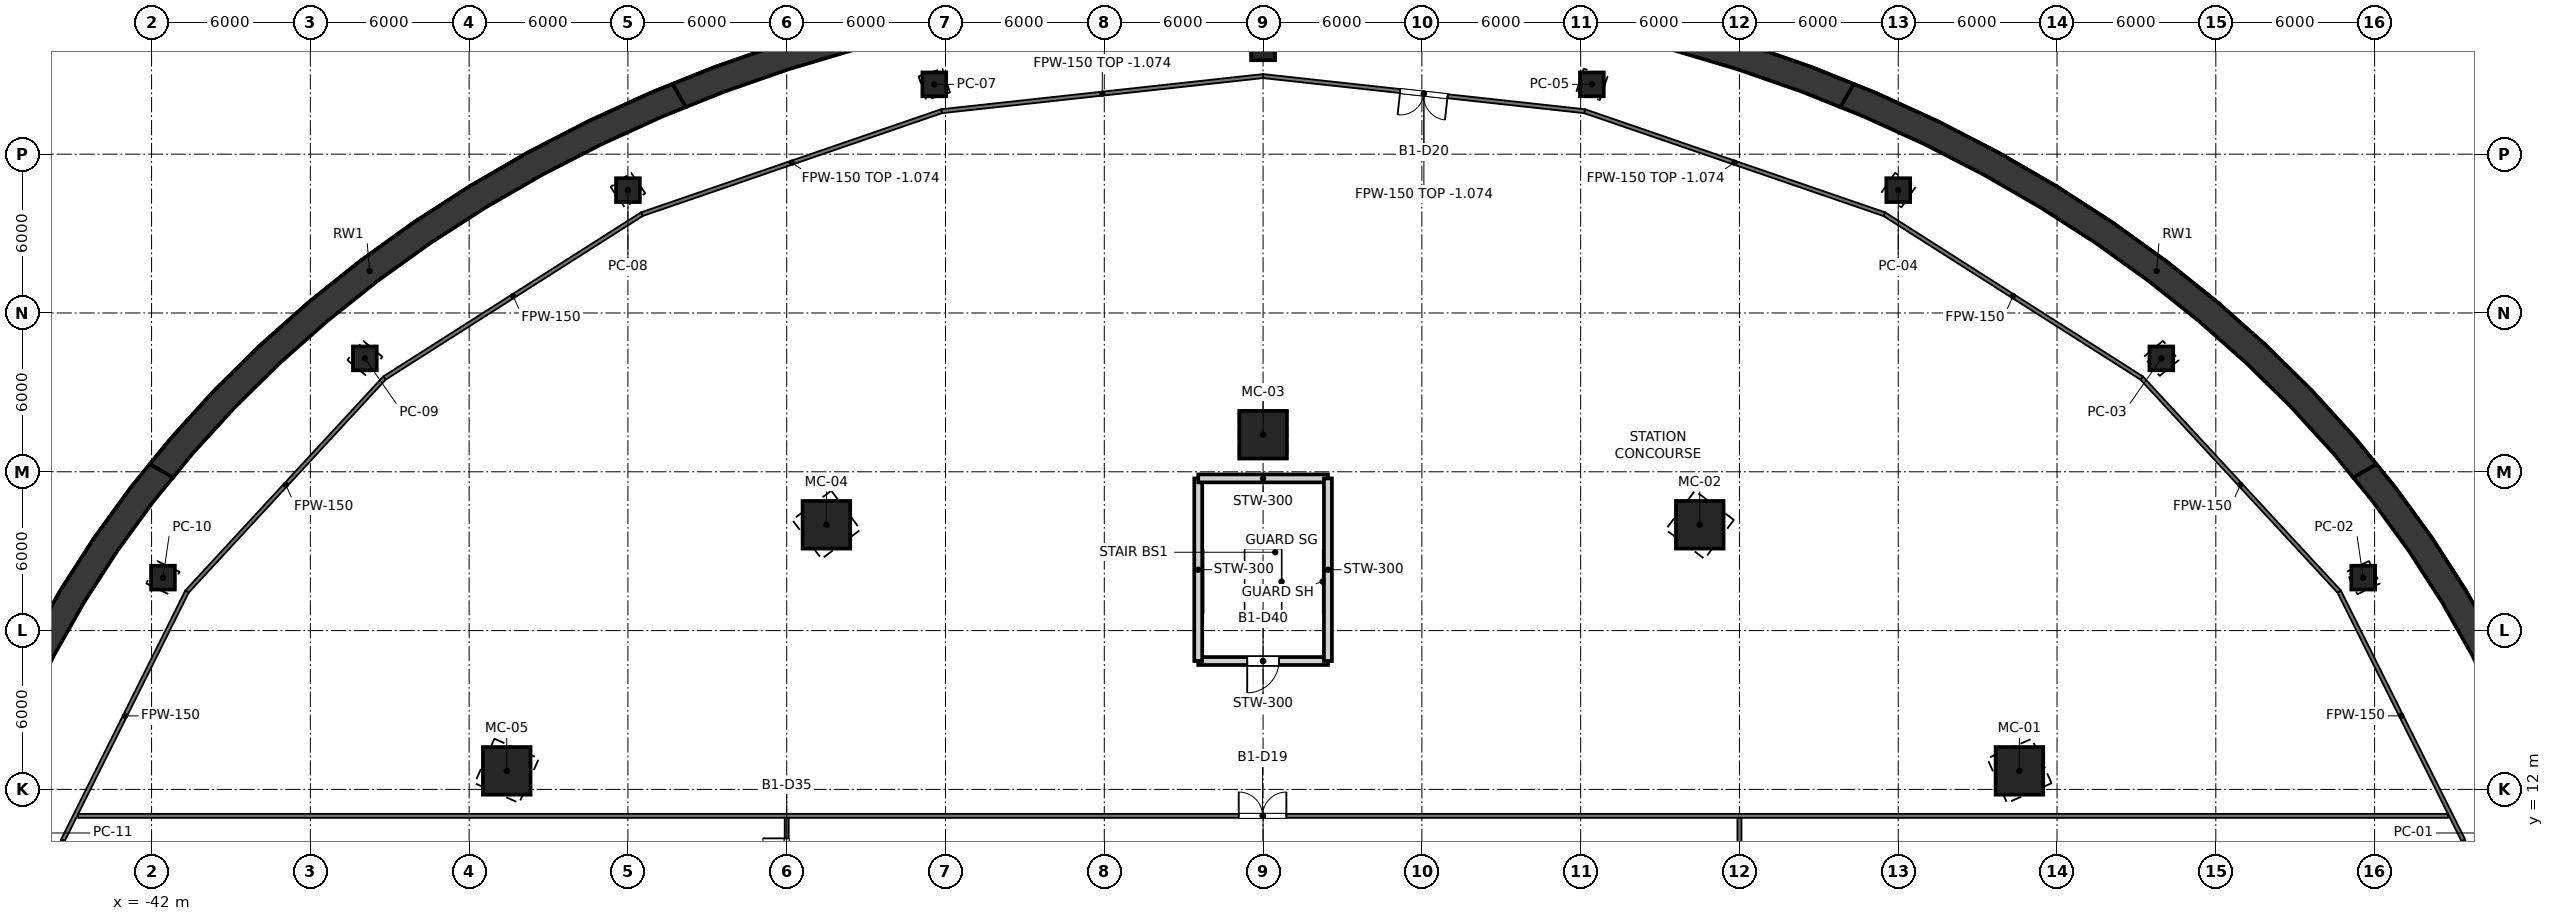
"""IFC4 building model, lengths in metres.
Left out: names, types, materials, properties, quantities, classifications, styles, units other than length and angle.
Written with IfcOpenShell. Run it as: python <this file> out.ifc"""

import sys

from ifc_helpers import new_model, si_unit, direction, frame, frame_2d, origin, origin_2d, place, context, subcontext, project, spatial, polyline, rectangle, hollow_rectangle, outline, extrude, element, fill, save


model = new_model("IFC4")
c1 = context("Model", 3, precision=1e-05, world=origin(), true_north=direction((0.0, 1.0)))
c2 = subcontext(c1, "Body", "Model", "MODEL_VIEW")
j1 = project(units=[si_unit("LENGTHUNIT", "METRE"), si_unit("PLANEANGLEUNIT", "RADIAN")], contexts=[c1])
p1 = place(None, origin())
s1 = spatial("IfcSite", under=j1, at=p1, CompositionType="ELEMENT")
p2 = place(p1, origin())
s2 = spatial("IfcBuilding", under=s1, at=p2, CompositionType="ELEMENT")
p3 = place(p2, frame((0.0, 0.0, -5.0)))
s3 = spatial("IfcBuildingStorey", under=s2, at=p3, CompositionType="ELEMENT", Elevation=-5.0)
p4 = place(p3, frame((0.0, 0.0, -0.3)))
e1 = element("IfcWall", 1, at=p4, inside=s3, PredefinedType="SOLIDWALL", context=c2, shape_type="SweptSolid", body=[
    extrude(outline(polyline([(42.065, 24.287), (41.191, 23.782), (41.934, 22.875), (43.301, 21.0), (44.55, 19.068), (45.677, 17.083), (46.679, 15.052), (47.553, 12.979), (48.296, 10.87), (48.907, 8.732), (49.385, 6.57), (49.726, 4.39), (49.931, 2.198), (50.0, 0.0), (51.0, 0.0), (50.93, 2.25), (50.721, 4.495), (50.372, 6.727), (49.885, 8.94), (49.262, 11.129), (48.504, 13.288), (47.613, 15.41), (46.591, 17.49), (45.441, 19.521), (44.167, 21.5), (42.772, 23.419), (42.065, 24.287)])), origin(), (0.0, 0.0, 1.0), 5.1),
])
e2 = element("IfcWall", 2, at=p4, inside=s3, PredefinedType="SOLIDWALL", context=c2, shape_type="SweptSolid", body=[
    extrude(outline(polyline([(22.315, 38.651), (21.811, 37.778), (22.699, 37.422), (25.0, 36.373), (27.232, 35.224), (29.389, 33.979), (31.466, 32.64), (33.457, 31.212), (35.355, 29.698), (37.157, 28.104), (38.857, 26.431), (40.451, 24.687), (41.191, 23.782), (42.065, 24.287), (41.26, 25.275), (39.635, 27.061), (37.9, 28.773), (36.062, 30.406), (34.126, 31.955), (32.095, 33.417), (29.977, 34.788), (27.777, 36.063), (25.5, 37.239), (23.154, 38.313), (22.315, 38.651)])), origin(), (0.0, 0.0, 1.0), 5.1),
])
e3 = element("IfcWall", 3, at=p4, inside=s3, PredefinedType="SOLIDWALL", context=c2, shape_type="SweptSolid", body=[
    extrude(outline(polyline([(0.0, 43.0), (0.0, 42.0), (2.617, 41.942), (5.226, 41.77), (7.822, 41.483), (10.396, 41.082), (12.941, 40.569), (15.451, 39.944), (17.918, 39.21), (20.337, 38.369), (21.811, 37.778), (22.315, 38.651), (20.744, 39.282), (18.277, 40.144), (15.76, 40.896), (13.2, 41.535), (10.604, 42.06), (7.978, 42.471), (5.331, 42.764), (2.669, 42.941), (0.0, 43.0)])), origin(), (0.0, 0.0, 1.0), 5.1),
])
e4 = element("IfcWall", 4, at=p4, inside=s3, PredefinedType="SOLIDWALL", context=c2, shape_type="SweptSolid", body=[
    extrude(outline(polyline([(-22.315, 38.651), (-21.811, 37.778), (-20.337, 38.369), (-17.918, 39.21), (-15.451, 39.944), (-12.941, 40.569), (-10.396, 41.082), (-7.822, 41.483), (-5.226, 41.77), (-2.617, 41.942), (0.0, 42.0), (0.0, 42.0), (0.0, 43.0), (0.0, 43.0), (-2.669, 42.941), (-5.331, 42.764), (-7.978, 42.471), (-10.604, 42.06), (-13.2, 41.535), (-15.76, 40.896), (-18.277, 40.144), (-20.744, 39.282), (-22.315, 38.651)])), origin(), (0.0, 0.0, 1.0), 5.1),
])
e5 = element("IfcWall", 5, at=p4, inside=s3, PredefinedType="SOLIDWALL", context=c2, shape_type="SweptSolid", body=[
    extrude(outline(polyline([(-42.065, 24.287), (-41.191, 23.782), (-40.451, 24.687), (-38.857, 26.431), (-37.157, 28.104), (-35.355, 29.698), (-33.457, 31.212), (-31.466, 32.64), (-29.389, 33.979), (-27.232, 35.224), (-25.0, 36.373), (-22.699, 37.422), (-21.811, 37.778), (-22.315, 38.651), (-23.154, 38.313), (-25.5, 37.239), (-27.777, 36.063), (-29.977, 34.788), (-32.095, 33.417), (-34.126, 31.955), (-36.062, 30.406), (-37.9, 28.773), (-39.635, 27.061), (-41.26, 25.275), (-42.065, 24.287)])), origin(), (0.0, 0.0, 1.0), 5.1),
])
e6 = element("IfcWall", 6, at=p4, inside=s3, PredefinedType="SOLIDWALL", context=c2, shape_type="SweptSolid", body=[
    extrude(outline(polyline([(-51.0, 0.0), (-50.0, 0.0), (-49.931, 2.198), (-49.726, 4.39), (-49.385, 6.57), (-48.907, 8.732), (-48.296, 10.87), (-47.553, 12.979), (-46.679, 15.052), (-45.677, 17.083), (-44.55, 19.068), (-43.301, 21.0), (-41.934, 22.875), (-41.191, 23.782), (-42.065, 24.287), (-42.772, 23.419), (-44.167, 21.5), (-45.441, 19.521), (-46.591, 17.49), (-47.613, 15.41), (-48.504, 13.288), (-49.262, 11.129), (-49.885, 8.94), (-50.372, 6.727), (-50.721, 4.495), (-50.93, 2.25), (-51.0, 0.0)])), origin(), (0.0, 0.0, 1.0), 5.1),
])
for number, where, z_axis, x_axis in (
    (7, (28.579, 12.7, -0.3), (0.0, 0.0, 1.0), (0.914, 0.406, 0.0)),
    (8, (16.5, 21.997, -0.3), (0.0, 0.0, 1.0), (0.6, 0.8, 0.0)),
    (9, (0.0, 25.4, -0.3), (0.0, 0.0, 1.0), (0.0, 1.0, 0.0)),
    (10, (-16.5, 21.997, -0.3), (0.0, 0.0, 1.0), (-0.6, 0.8, 0.0)),
    (11, (-28.579, 12.7, -0.3), (0.0, 0.0, 1.0), (-0.914, 0.406, 0.0)),
):
    element("IfcColumn", number, at=place(p3, frame(where, z_axis=z_axis, x_axis=x_axis)), inside=s3, PredefinedType="COLUMN", context=c2, shape_type="SweptSolid", body=[
        extrude(hollow_rectangle(XDim=1.8, YDim=1.8, WallThickness=0.08, at=origin_2d()), origin(), (0.0, 0.0, 1.0), 5.3),
    ])
for number, where, z_axis, x_axis in (
    (12, (41.569, 20.0, -0.3), (0.0, 0.0, 1.0), (0.901, 0.434, 0.0)),
    (13, (33.941, 28.284, -0.3), (0.0, 0.0, 1.0), (0.768, 0.64, 0.0)),
    (14, (24.0, 34.641, -0.3), (0.0, 0.0, 1.0), (0.569, 0.822, 0.0)),
    (15, (12.423, 38.637, -0.3), (0.0, 0.0, 1.0), (0.306, 0.952, 0.0)),
    (16, (0.0, 40.0, -0.3), (0.0, 0.0, 1.0), (0.0, 1.0, 0.0)),
    (17, (-12.423, 38.637, -0.3), (0.0, 0.0, 1.0), (-0.306, 0.952, 0.0)),
    (18, (-24.0, 34.641, -0.3), (0.0, 0.0, 1.0), (-0.569, 0.822, 0.0)),
    (19, (-33.941, 28.284, -0.3), (0.0, 0.0, 1.0), (-0.768, 0.64, 0.0)),
    (20, (-41.569, 20.0, -0.3), (0.0, 0.0, 1.0), (-0.901, 0.434, 0.0)),
):
    element("IfcColumn", number, at=place(p3, frame(where, z_axis=z_axis, x_axis=x_axis)), inside=s3, PredefinedType="COLUMN", context=c2, shape_type="SweptSolid", body=[
        extrude(hollow_rectangle(XDim=0.9, YDim=0.9, WallThickness=0.04, at=origin_2d()), origin(), (0.0, 0.0, 1.0), 5.3),
    ])
p5 = place(p3, frame((2.45, 16.85, 0.0), z_axis=(0.0, 0.0, 1.0), x_axis=(-1.0, 0.0, 0.0)))
e21 = element("IfcWall", 21, at=p5, inside=s3, PredefinedType="SOLIDWALL", context=c2, shape_type="SweptSolid", body=[
    extrude(rectangle(XDim=4.9, YDim=0.3, at=frame_2d((2.45, 0.0))), origin(), (0.0, 0.0, 1.0), 4.7),
])
p6 = place(p5, frame((1.85, 0.0, 0.0)))
e22 = element("IfcOpeningElement", 22, at=p6, cuts=e21, PredefinedType="OPENING", context=c2, shape_type="SweptSolid", body=[
    extrude(rectangle(XDim=1.2, YDim=2.1, at=frame_2d((0.6, 1.05))), frame((0.0, 0.15, 0.0), z_axis=(0.0, -1.0, 0.0), x_axis=(1.0, 0.0, 0.0)), (0.0, 0.0, 1.0), 0.3),
])
p7 = place(p3, frame((-2.45, 16.85, 0.0), z_axis=(0.0, 0.0, 1.0), x_axis=(0.0, 1.0, 0.0)))
e23 = element("IfcWall", 23, at=p7, inside=s3, PredefinedType="SOLIDWALL", context=c2, shape_type="SweptSolid", body=[
    extrude(rectangle(XDim=6.9, YDim=0.3, at=frame_2d((3.45, 0.0))), origin(), (0.0, 0.0, 1.0), 4.7),
])
p8 = place(p3, frame((-2.45, 23.75, 0.0), z_axis=(0.0, 0.0, 1.0), x_axis=(1.0, 0.0, 0.0)))
e24 = element("IfcWall", 24, at=p8, inside=s3, PredefinedType="SOLIDWALL", context=c2, shape_type="SweptSolid", body=[
    extrude(rectangle(XDim=4.9, YDim=0.3, at=frame_2d((2.45, 0.0))), origin(), (0.0, 0.0, 1.0), 4.7),
])
p9 = place(p3, frame((2.45, 23.75, 0.0), z_axis=(0.0, 0.0, 1.0), x_axis=(0.0, -1.0, 0.0)))
e25 = element("IfcWall", 25, at=p9, inside=s3, PredefinedType="SOLIDWALL", context=c2, shape_type="SweptSolid", body=[
    extrude(rectangle(XDim=6.9, YDim=0.3, at=frame_2d((3.45, 0.0))), origin(), (0.0, 0.0, 1.0), 4.7),
])
p10 = place(p3, frame((46.95, 0.0, 0.0), z_axis=(0.0, 0.0, 1.0), x_axis=(-0.156737547616, 0.98764028936, 0.0)))
e26 = element("IfcWall", 26, at=p10, inside=s3, PredefinedType="PARTITIONING", context=c2, shape_type="SweptSolid", body=[
    extrude(rectangle(XDim=10.207, YDim=0.15, at=frame_2d((5.104, 0.0))), origin(), (0.0, 0.0, 1.0), 3.845),
])
p11 = place(p10, frame((6.704, 0.0, 0.0)))
e27 = element("IfcOpeningElement", 27, at=p11, cuts=e26, PredefinedType="OPENING", context=c2, shape_type="SweptSolid", body=[
    extrude(rectangle(XDim=1.0, YDim=2.1, at=frame_2d((0.5, 1.05))), frame((0.0, 0.075, 0.0), z_axis=(0.0, -1.0, 0.0), x_axis=(1.0, 0.0, 0.0)), (0.0, 0.0, 1.0), 0.15),
])
p12 = place(p3, frame((45.35, 10.081, 0.0), z_axis=(0.0, 0.0, 1.0), x_axis=(-0.446692676619, 0.894687460879, 0.0)))
e28 = element("IfcWall", 28, at=p12, inside=s3, PredefinedType="PARTITIONING", context=c2, shape_type="SweptSolid", body=[
    extrude(rectangle(XDim=10.5, YDim=0.15, at=frame_2d((5.25, 0.0))), origin(), (0.0, 0.0, 1.0), 3.845),
])
p13 = place(p3, frame((40.66, 19.475, 0.0), z_axis=(0.0, 0.0, 1.0), x_axis=(-0.679018932137, 0.734120759685, 0.0)))
e29 = element("IfcWall", 29, at=p13, inside=s3, PredefinedType="PARTITIONING", context=c2, shape_type="SweptSolid", body=[
    extrude(rectangle(XDim=10.988, YDim=0.15, at=frame_2d((5.494, 0.0))), origin(), (0.0, 0.0, 1.0), 3.845),
])
p14 = place(p3, frame((33.199, 27.542, 0.0), z_axis=(0.0, 0.0, 1.0), x_axis=(-0.84357600759, 0.537009794527, 0.0)))
e30 = element("IfcWall", 30, at=p14, inside=s3, PredefinedType="PARTITIONING", context=c2, shape_type="SweptSolid", body=[
    extrude(rectangle(XDim=11.527, YDim=0.15, at=frame_2d((5.763, 0.0))), origin(), (0.0, 0.0, 1.0), 3.845),
])
p15 = place(p3, frame((23.475, 33.732, 0.0), z_axis=(0.0, 0.0, 1.0), x_axis=(-0.945720874623, 0.324980041391, 0.0)))
e31 = element("IfcWall", 31, at=p15, inside=s3, PredefinedType="PARTITIONING", context=c2, shape_type="SweptSolid", body=[
    extrude(rectangle(XDim=11.973, YDim=0.15, at=frame_2d((5.987, 0.0))), origin(), (0.0, 0.0, 1.0), 3.926),
])
p16 = place(p3, frame((12.152, 37.623, 0.0), z_axis=(0.0, 0.0, 1.0), x_axis=(-0.994088780117, 0.108570241069, 0.0)))
e32 = element("IfcWall", 32, at=p16, inside=s3, PredefinedType="PARTITIONING", context=c2, shape_type="SweptSolid", body=[
    extrude(rectangle(XDim=12.224, YDim=0.15, at=frame_2d((6.112, 0.0))), origin(), (0.0, 0.0, 1.0), 3.926),
])
p17 = place(p16, frame((5.212, 0.0, 0.0)))
e33 = element("IfcOpeningElement", 33, at=p17, cuts=e32, PredefinedType="OPENING", context=c2, shape_type="SweptSolid", body=[
    extrude(rectangle(XDim=1.8, YDim=2.1, at=frame_2d((0.9, 1.05))), frame((0.0, 0.075, 0.0), z_axis=(0.0, -1.0, 0.0), x_axis=(1.0, 0.0, 0.0)), (0.0, 0.0, 1.0), 0.15),
])
p18 = place(p3, frame((0.0, 38.95, 0.0), z_axis=(0.0, 0.0, 1.0), x_axis=(-0.994088780117, -0.108570241069, 0.0)))
e34 = element("IfcWall", 34, at=p18, inside=s3, PredefinedType="PARTITIONING", context=c2, shape_type="SweptSolid", body=[
    extrude(rectangle(XDim=12.224, YDim=0.15, at=frame_2d((6.112, 0.0))), origin(), (0.0, 0.0, 1.0), 3.926),
])
p19 = place(p3, frame((-12.152, 37.623, 0.0), z_axis=(0.0, 0.0, 1.0), x_axis=(-0.945720874623, -0.324980041391, 0.0)))
e35 = element("IfcWall", 35, at=p19, inside=s3, PredefinedType="PARTITIONING", context=c2, shape_type="SweptSolid", body=[
    extrude(rectangle(XDim=11.973, YDim=0.15, at=frame_2d((5.987, 0.0))), origin(), (0.0, 0.0, 1.0), 3.926),
])
p20 = place(p3, frame((-23.475, 33.732, 0.0), z_axis=(0.0, 0.0, 1.0), x_axis=(-0.84357600759, -0.537009794527, 0.0)))
e36 = element("IfcWall", 36, at=p20, inside=s3, PredefinedType="PARTITIONING", context=c2, shape_type="SweptSolid", body=[
    extrude(rectangle(XDim=11.527, YDim=0.15, at=frame_2d((5.763, 0.0))), origin(), (0.0, 0.0, 1.0), 3.845),
])
p21 = place(p3, frame((-33.199, 27.542, 0.0), z_axis=(0.0, 0.0, 1.0), x_axis=(-0.679018932137, -0.734120759685, 0.0)))
e37 = element("IfcWall", 37, at=p21, inside=s3, PredefinedType="PARTITIONING", context=c2, shape_type="SweptSolid", body=[
    extrude(rectangle(XDim=10.988, YDim=0.15, at=frame_2d((5.494, 0.0))), origin(), (0.0, 0.0, 1.0), 3.845),
])
p22 = place(p3, frame((-40.66, 19.475, 0.0), z_axis=(0.0, 0.0, 1.0), x_axis=(-0.446692676619, -0.894687460879, 0.0)))
e38 = element("IfcWall", 38, at=p22, inside=s3, PredefinedType="PARTITIONING", context=c2, shape_type="SweptSolid", body=[
    extrude(rectangle(XDim=10.5, YDim=0.15, at=frame_2d((5.25, 0.0))), origin(), (0.0, 0.0, 1.0), 3.845),
])
p23 = place(p3, frame((-45.35, 10.081, 0.0), z_axis=(0.0, 0.0, 1.0), x_axis=(-0.156737547616, -0.98764028936, 0.0)))
e39 = element("IfcWall", 39, at=p23, inside=s3, PredefinedType="PARTITIONING", context=c2, shape_type="SweptSolid", body=[
    extrude(rectangle(XDim=10.207, YDim=0.15, at=frame_2d((5.104, 0.0))), origin(), (0.0, 0.0, 1.0), 3.845),
])
p24 = place(p23, frame((4.204, 0.0, 0.0)))
e40 = element("IfcOpeningElement", 40, at=p24, cuts=e39, PredefinedType="OPENING", context=c2, shape_type="SweptSolid", body=[
    extrude(rectangle(XDim=1.8, YDim=2.1, at=frame_2d((0.9, 1.05))), frame((0.0, 0.075, 0.0), z_axis=(0.0, -1.0, 0.0), x_axis=(1.0, 0.0, 0.0)), (0.0, 0.0, 1.0), 0.15),
])
p25 = place(p3, frame((-44.77, 11.0, 0.0), z_axis=(0.0, 0.0, 1.0), x_axis=(1.0, 0.0, 0.0)))
e41 = element("IfcWall", 41, at=p25, inside=s3, PredefinedType="PARTITIONING", context=c2, shape_type="SweptSolid", body=[
    extrude(rectangle(XDim=89.54, YDim=0.15, at=frame_2d((44.77, 0.0))), origin(), (0.0, 0.0, 1.0), 3.768),
])
p26 = place(p25, frame((43.85, 0.0, 0.0)))
e42 = element("IfcOpeningElement", 42, at=p26, cuts=e41, PredefinedType="OPENING", context=c2, shape_type="SweptSolid", body=[
    extrude(rectangle(XDim=1.8, YDim=2.1, at=frame_2d((0.9, 1.05))), frame((0.0, 0.075, 0.0), z_axis=(0.0, -1.0, 0.0), x_axis=(1.0, 0.0, 0.0)), (0.0, 0.0, 1.0), 0.15),
])
p27 = place(p3, frame((18.0, -10.925, 0.0), z_axis=(0.0, 0.0, 1.0), x_axis=(0.0, 1.0, 0.0)))
e43 = element("IfcWall", 43, at=p27, inside=s3, PredefinedType="PARTITIONING", context=c2, shape_type="SweptSolid", body=[
    extrude(rectangle(XDim=21.85, YDim=0.15, at=frame_2d((10.925, 0.0))), origin(), (0.0, 0.0, 1.0), 3.777),
])
p28 = place(p27, frame((2.95, 0.0, 0.0)))
e44 = element("IfcOpeningElement", 44, at=p28, cuts=e43, PredefinedType="OPENING", context=c2, shape_type="SweptSolid", body=[
    extrude(rectangle(XDim=1.0, YDim=2.1, at=frame_2d((0.5, 1.05))), frame((0.0, 0.075, 0.0), z_axis=(0.0, -1.0, 0.0), x_axis=(1.0, 0.0, 0.0)), (0.0, 0.0, 1.0), 0.15),
])
p29 = place(p27, frame((10.45, 0.0, 0.0)))
e45 = element("IfcOpeningElement", 45, at=p29, cuts=e43, PredefinedType="OPENING", context=c2, shape_type="SweptSolid", body=[
    extrude(rectangle(XDim=1.0, YDim=2.1, at=frame_2d((0.5, 1.05))), frame((0.0, 0.075, 0.0), z_axis=(0.0, -1.0, 0.0), x_axis=(1.0, 0.0, 0.0)), (0.0, 0.0, 1.0), 0.15),
])
p30 = place(p27, frame((17.925, 0.0, 0.0)))
e46 = element("IfcOpeningElement", 46, at=p30, cuts=e43, PredefinedType="OPENING", context=c2, shape_type="SweptSolid", body=[
    extrude(rectangle(XDim=1.0, YDim=2.1, at=frame_2d((0.5, 1.05))), frame((0.0, 0.075, 0.0), z_axis=(0.0, -1.0, 0.0), x_axis=(1.0, 0.0, 0.0)), (0.0, 0.0, 1.0), 0.15),
])
p31 = place(p3, frame((-18.0, -10.925, 0.0), z_axis=(0.0, 0.0, 1.0), x_axis=(0.0, 1.0, 0.0)))
e47 = element("IfcWall", 47, at=p31, inside=s3, PredefinedType="PARTITIONING", context=c2, shape_type="SweptSolid", body=[
    extrude(rectangle(XDim=21.85, YDim=0.15, at=frame_2d((10.925, 0.0))), origin(), (0.0, 0.0, 1.0), 3.777),
])
p32 = place(p31, frame((19.275, 0.0, 0.0)))
e48 = element("IfcOpeningElement", 48, at=p32, cuts=e47, PredefinedType="OPENING", context=c2, shape_type="SweptSolid", body=[
    extrude(rectangle(XDim=1.8, YDim=2.1, at=frame_2d((0.9, 1.05))), frame((0.0, 0.075, 0.0), z_axis=(0.0, -1.0, 0.0), x_axis=(1.0, 0.0, 0.0)), (0.0, 0.0, 1.0), 0.15),
])
p33 = place(p31, frame((5.8, 0.0, 0.0)))
e49 = element("IfcOpeningElement", 49, at=p33, cuts=e47, PredefinedType="OPENING", context=c2, shape_type="SweptSolid", body=[
    extrude(rectangle(XDim=1.0, YDim=2.1, at=frame_2d((0.5, 1.05))), frame((0.0, 0.075, 0.0), z_axis=(0.0, -1.0, 0.0), x_axis=(1.0, 0.0, 0.0)), (0.0, 0.0, 1.0), 0.15),
])
p34 = place(p31, frame((10.4, 0.0, 0.0)))
e50 = element("IfcOpeningElement", 50, at=p34, cuts=e47, PredefinedType="OPENING", context=c2, shape_type="SweptSolid", body=[
    extrude(rectangle(XDim=1.0, YDim=2.1, at=frame_2d((0.5, 1.05))), frame((0.0, 0.075, 0.0), z_axis=(0.0, -1.0, 0.0), x_axis=(1.0, 0.0, 0.0)), (0.0, 0.0, 1.0), 0.15),
])
p35 = place(p31, frame((15.0, 0.0, 0.0)))
e51 = element("IfcOpeningElement", 51, at=p35, cuts=e47, PredefinedType="OPENING", context=c2, shape_type="SweptSolid", body=[
    extrude(rectangle(XDim=1.0, YDim=2.1, at=frame_2d((0.5, 1.05))), frame((0.0, 0.075, 0.0), z_axis=(0.0, -1.0, 0.0), x_axis=(1.0, 0.0, 0.0)), (0.0, 0.0, 1.0), 0.15),
])
p36 = place(p26, origin())
e52 = element("IfcDoor", 52, at=p36, inside=s3, OperationType="DOUBLE_DOOR_SINGLE_SWING", PredefinedType="DOOR", context=c2, shape_type="SweptSolid", body=[
    extrude(rectangle(XDim=1.8, YDim=2.1, at=frame_2d((0.9, 1.05))), frame((0.0, 0.025, 0.0), z_axis=(0.0, -1.0, 0.0), x_axis=(1.0, 0.0, 0.0)), (0.0, 0.0, 1.0), 0.05),
])
fill(e42, e52)
p37 = place(p17, origin())
e53 = element("IfcDoor", 53, at=p37, inside=s3, OperationType="DOUBLE_DOOR_SINGLE_SWING", PredefinedType="DOOR", context=c2, shape_type="SweptSolid", body=[
    extrude(rectangle(XDim=1.8, YDim=2.1, at=frame_2d((0.9, 1.05))), frame((0.0, 0.025, 0.0), z_axis=(0.0, -1.0, 0.0), x_axis=(1.0, 0.0, 0.0)), (0.0, 0.0, 1.0), 0.05),
])
fill(e33, e53)
p38 = place(p32, origin())
e54 = element("IfcDoor", 54, at=p38, inside=s3, OperationType="DOUBLE_DOOR_SINGLE_SWING", PredefinedType="DOOR", context=c2, shape_type="SweptSolid", body=[
    extrude(rectangle(XDim=1.8, YDim=2.1, at=frame_2d((0.9, 1.05))), frame((0.0, 0.025, 0.0), z_axis=(0.0, -1.0, 0.0), x_axis=(1.0, 0.0, 0.0)), (0.0, 0.0, 1.0), 0.05),
])
fill(e48, e54)
p39 = place(p6, origin())
e55 = element("IfcDoor", 55, at=p39, inside=s3, OperationType="SINGLE_SWING_RIGHT", PredefinedType="DOOR", context=c2, shape_type="SweptSolid", body=[
    extrude(rectangle(XDim=1.2, YDim=2.1, at=frame_2d((0.6, 1.05))), frame((0.0, 0.025, 0.0), z_axis=(0.0, -1.0, 0.0), x_axis=(1.0, 0.0, 0.0)), (0.0, 0.0, 1.0), 0.05),
])
fill(e22, e55)
save(model, sys.argv[1])
